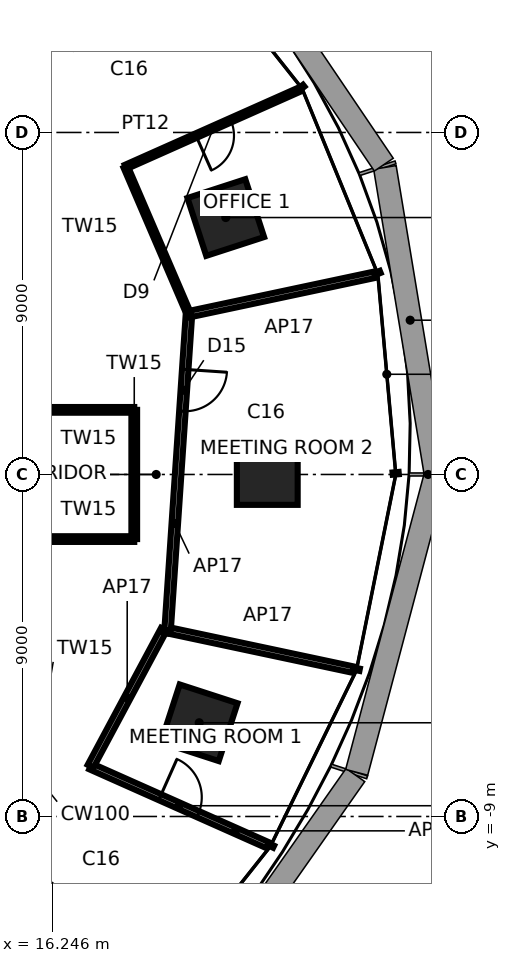
"""IFC4 building model, lengths in metres.
Left out: names, types, materials, properties, quantities, classifications, styles, units other than length and angle.
Written with IfcOpenShell. Run it as: python <this file> out.ifc"""

import sys

from ifc_helpers import new_model, si_unit, direction, frame, frame_2d, origin, origin_2d, place, context, subcontext, project, spatial, rectangle, extrude, element, fill, save


model = new_model("IFC4")
c1 = context("Model", 3, precision=1e-05, world=origin(), true_north=direction((0.0, 1.0)))
c2 = subcontext(c1, "Body", "Model", "MODEL_VIEW")
j1 = project(units=[si_unit("LENGTHUNIT", "METRE"), si_unit("PLANEANGLEUNIT", "RADIAN")], contexts=[c1])
p1 = place(None, origin())
s1 = spatial("IfcSite", under=j1, at=p1, CompositionType="ELEMENT")
p2 = place(p1, origin())
s2 = spatial("IfcBuilding", under=s1, at=p2, CompositionType="ELEMENT")
p3 = place(p2, frame((0.0, 0.0, 127.5)))
s3 = spatial("IfcBuildingStorey", under=s2, at=p3, CompositionType="ELEMENT", Elevation=127.5)
for number, where, z_axis, x_axis in (
    (1, (21.9, 0.0, 0.0), (0.0, 0.0, 1.0), (1.0, 0.0, 0.0)),
    (2, (20.808, 6.761, 0.0), (0.0, 0.0, 1.0), (0.951, 0.309, 0.0)),
    (3, (16.315, -11.854, 0.0), (0.0, 0.0, 1.0), (0.809, -0.588, 0.0)),
    (4, (20.109, -6.534, 0.0), (0.0, 0.0, 1.0), (0.951, -0.309, 0.0)),
):
    element("IfcColumn", number, at=place(p3, frame(where, z_axis=z_axis, x_axis=x_axis)), inside=s3, PredefinedType="COLUMN", context=c2, shape_type="SweptSolid", body=[
        extrude(rectangle(XDim=1.6, YDim=1.6, at=origin_2d()), origin(), (0.0, 0.0, 1.0), 3.9),
    ])
p4 = place(p3, frame((17.25, -7.68, 0.0), z_axis=(0.0, 0.0, 1.0), x_axis=(0.913540908219, -0.406746861095, 0.0)))
e5 = element("IfcWall", 5, at=p4, inside=s3, PredefinedType="PARTITIONING", context=c2, shape_type="SweptSolid", body=[
    extrude(rectangle(XDim=5.1, YDim=0.17, at=frame_2d((2.55, 0.0))), origin(), (0.0, 0.0, 1.0), 3.74),
])
p5 = place(p4, frame((2.0, 0.0, 0.0)))
e6 = element("IfcOpeningElement", 6, at=p5, cuts=e5, PredefinedType="OPENING", context=c2, shape_type="SweptSolid", body=[
    extrude(rectangle(XDim=1.1, YDim=2.4, at=frame_2d((0.55, 1.2))), frame((0.0, 0.095, 0.0), z_axis=(0.0, -1.0, 0.0), x_axis=(1.0, 0.0, 0.0)), (0.0, 0.0, 1.0), 0.19),
])
p6 = place(p3, frame((19.179, -4.077, 0.0), z_axis=(0.0, 0.0, 1.0), x_axis=(-0.472146825295, -0.881519923407, 0.0)))
e7 = element("IfcWall", 7, at=p6, inside=s3, PredefinedType="PARTITIONING", context=c2, shape_type="SweptSolid", body=[
    extrude(rectangle(XDim=4.088, YDim=0.17, at=frame_2d((2.044, 0.0))), origin(), (0.0, 0.0, 1.0), 3.74),
])
p7 = place(p3, frame((19.277, -4.097, 0.0), z_axis=(0.0, 0.0, 1.0), x_axis=(-0.978158850918, 0.20785875582, 0.0)))
e8 = element("IfcWall", 8, at=p7, inside=s3, PredefinedType="PARTITIONING", context=c2, shape_type="SweptSolid", body=[
    extrude(rectangle(XDim=0.1, YDim=0.17, at=frame_2d((0.05, 0.0))), origin(), (0.0, 0.0, 1.0), 3.74),
])
p8 = place(p3, frame((19.277, -4.097, 0.0), z_axis=(0.0, 0.0, 1.0), x_axis=(0.978149046495, -0.207904888932, 0.0)))
e9 = element("IfcWall", 9, at=p8, inside=s3, PredefinedType="PARTITIONING", context=c2, shape_type="SweptSolid", body=[
    extrude(rectangle(XDim=5.0, YDim=0.17, at=frame_2d((2.5, 0.0))), origin(), (0.0, 0.0, 1.0), 3.74),
])
p9 = place(p3, frame((16.0, -1.7, 0.0), z_axis=(0.0, 0.0, 1.0), x_axis=(1.0, 0.0, 0.0)))
e10 = element("IfcWall", 10, at=p9, inside=s3, PredefinedType="PARTITIONING", context=c2, shape_type="SweptSolid", body=[
    extrude(rectangle(XDim=2.4, YDim=0.15, at=frame_2d((1.2, 0.0))), origin(), (0.0, 0.0, 1.0), 3.74),
])
p10 = place(p3, frame((18.4, -1.7, 0.0), z_axis=(0.0, 0.0, 1.0), x_axis=(0.0, 1.0, 0.0)))
e11 = element("IfcWall", 11, at=p10, inside=s3, PredefinedType="PARTITIONING", context=c2, shape_type="SweptSolid", body=[
    extrude(rectangle(XDim=3.4, YDim=0.15, at=frame_2d((1.7, 0.0))), origin(), (0.0, 0.0, 1.0), 3.74),
])
p11 = place(p3, frame((19.84, 4.217, 0.0), z_axis=(0.0, 0.0, 1.0), x_axis=(-0.067498983032, -0.997719342947, 0.0)))
e12 = element("IfcWall", 12, at=p11, inside=s3, PredefinedType="PARTITIONING", context=c2, shape_type="SweptSolid", body=[
    extrude(rectangle(XDim=8.333, YDim=0.17, at=frame_2d((4.167, 0.0))), origin(), (0.0, 0.0, 1.0), 3.74),
])
p12 = place(p11, frame((1.456, 0.0, 0.0)))
e13 = element("IfcOpeningElement", 13, at=p12, cuts=e12, PredefinedType="OPENING", context=c2, shape_type="SweptSolid", body=[
    extrude(rectangle(XDim=1.1, YDim=2.4, at=frame_2d((0.55, 1.2))), frame((0.0, 0.095, 0.0), z_axis=(0.0, -1.0, 0.0), x_axis=(1.0, 0.0, 0.0)), (0.0, 0.0, 1.0), 0.19),
])
p13 = place(p3, frame((18.4, 1.7, 0.0), z_axis=(0.0, 0.0, 1.0), x_axis=(-1.0, 0.0, 0.0)))
e14 = element("IfcWall", 14, at=p13, inside=s3, PredefinedType="PARTITIONING", context=c2, shape_type="SweptSolid", body=[
    extrude(rectangle(XDim=2.4, YDim=0.15, at=frame_2d((1.2, 0.0))), origin(), (0.0, 0.0, 1.0), 3.74),
])
p14 = place(p3, frame((24.73, 5.257, 0.0), z_axis=(0.0, 0.0, 1.0), x_axis=(-0.978149046495, -0.207904888932, 0.0)))
e15 = element("IfcWall", 15, at=p14, inside=s3, PredefinedType="PARTITIONING", context=c2, shape_type="SweptSolid", body=[
    extrude(rectangle(XDim=5.0, YDim=0.17, at=frame_2d((2.5, 0.0))), origin(), (0.0, 0.0, 1.0), 3.74),
])
p15 = place(p3, frame((18.175, 8.092, 0.0), z_axis=(0.0, 0.0, 1.0), x_axis=(0.394806421401, -0.918764327573, 0.0)))
e16 = element("IfcWall", 16, at=p15, inside=s3, PredefinedType="PARTITIONING", context=c2, shape_type="SweptSolid", body=[
    extrude(rectangle(XDim=4.217, YDim=0.12, at=frame_2d((2.109, 0.0))), origin(), (0.0, 0.0, 1.0), 3.74),
])
p16 = place(p3, frame((22.742, 10.125, 0.0), z_axis=(0.0, 0.0, 1.0), x_axis=(-0.913541529049, -0.406745466726, 0.0)))
e17 = element("IfcWall", 17, at=p16, inside=s3, PredefinedType="PARTITIONING", context=c2, shape_type="SweptSolid", body=[
    extrude(rectangle(XDim=5.0, YDim=0.12, at=frame_2d((2.5, 0.0))), origin(), (0.0, 0.0, 1.0), 3.74),
])
p17 = place(p16, frame((1.975, 0.0, 0.0)))
e18 = element("IfcOpeningElement", 18, at=p17, cuts=e17, PredefinedType="OPENING", context=c2, shape_type="SweptSolid", body=[
    extrude(rectangle(XDim=1.0, YDim=2.4, at=frame_2d((0.5, 1.2))), frame((0.0, 0.07, 0.0), z_axis=(0.0, -1.0, 0.0), x_axis=(1.0, 0.0, 0.0)), (0.0, 0.0, 1.0), 0.14),
])
p18 = place(p17, origin())
e19 = element("IfcDoor", 19, at=p18, inside=s3, OperationType="SINGLE_SWING_RIGHT", PredefinedType="DOOR", context=c2, shape_type="SweptSolid", body=[
    extrude(rectangle(XDim=1.0, YDim=2.4, at=frame_2d((0.5, 1.2))), frame((0.0, 0.025, 0.0), z_axis=(0.0, -1.0, 0.0), x_axis=(1.0, 0.0, 0.0)), (0.0, 0.0, 1.0), 0.05),
])
fill(e18, e19)
p19 = place(p5, origin())
e20 = element("IfcDoor", 20, at=p19, inside=s3, OperationType="SINGLE_SWING_LEFT", PredefinedType="DOOR", context=c2, shape_type="SweptSolid", body=[
    extrude(rectangle(XDim=1.1, YDim=2.4, at=frame_2d((0.55, 1.2))), frame((0.0, 0.025, 0.0), z_axis=(0.0, -1.0, 0.0), x_axis=(1.0, 0.0, 0.0)), (0.0, 0.0, 1.0), 0.05),
])
fill(e6, e20)
p20 = place(p12, origin())
e21 = element("IfcDoor", 21, at=p20, inside=s3, OperationType="SINGLE_SWING_LEFT", PredefinedType="DOOR", context=c2, shape_type="SweptSolid", body=[
    extrude(rectangle(XDim=1.1, YDim=2.4, at=frame_2d((0.55, 1.2))), frame((0.0, 0.025, 0.0), z_axis=(0.0, -1.0, 0.0), x_axis=(1.0, 0.0, 0.0)), (0.0, 0.0, 1.0), 0.05),
])
fill(e13, e21)
save(model, sys.argv[1])
